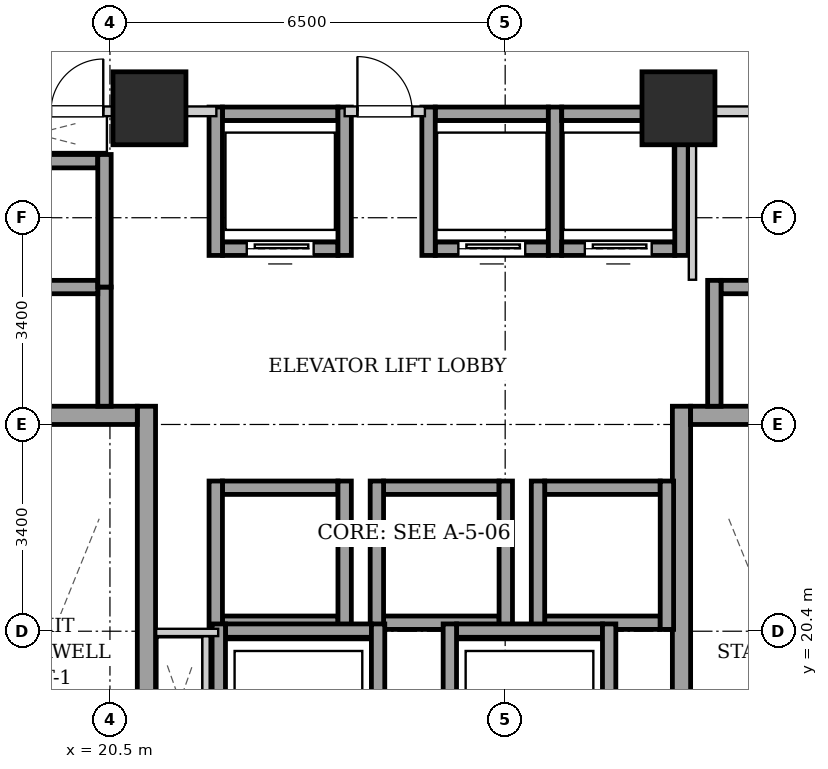
"""IFC4 building model, lengths in metres.
Left out: names, types, materials, properties, quantities, classifications, styles, units other than length and angle.
Written with IfcOpenShell. Run it as: python <this file> out.ifc"""

import sys

from ifc_helpers import new_model, si_unit, direction, frame, frame_2d, origin, origin_2d, place, context, subcontext, project, spatial, rectangle, extrude, element, fill, save


model = new_model("IFC4")
c1 = context("Model", 3, precision=1e-05, world=origin(), true_north=direction((0.0, 1.0)))
c2 = subcontext(c1, "Body", "Model", "MODEL_VIEW")
j1 = project(units=[si_unit("LENGTHUNIT", "METRE"), si_unit("PLANEANGLEUNIT", "RADIAN")], contexts=[c1])
p1 = place(None, origin())
s1 = spatial("IfcSite", under=j1, at=p1, CompositionType="ELEMENT")
p2 = place(p1, origin())
s2 = spatial("IfcBuilding", under=s1, at=p2, CompositionType="ELEMENT")
p3 = place(p2, frame((0.0, 0.0, 64.2)))
s3 = spatial("IfcBuildingStorey", under=s2, at=p3, CompositionType="ELEMENT", Elevation=64.2)
for number, where, z_axis, x_axis in (
    (1, (21.15, 29.0, 0.0), (0.0, 0.0, 1.0), (1.0, 0.0, 0.0)),
    (2, (29.85, 29.0, 0.0), (0.0, 0.0, 1.0), (1.0, 0.0, 0.0)),
):
    element("IfcColumn", number, at=place(p3, frame(where, z_axis=z_axis, x_axis=x_axis)), inside=s3, PredefinedType="COLUMN", context=c2, shape_type="SweptSolid", body=[
        extrude(rectangle(XDim=1.2, YDim=1.2, at=origin_2d()), origin(), (0.0, 0.0, 1.0), 3.2),
    ])
p4 = place(p3, frame((21.1, 15.1, 0.0), z_axis=(0.0, 0.0, 1.0), x_axis=(0.0, 1.0, 0.0)))
e3 = element("IfcWall", 3, at=p4, inside=s3, PredefinedType="SHEAR", context=c2, shape_type="SweptSolid", body=[
    extrude(rectangle(XDim=9.0, YDim=0.3, at=frame_2d((4.5, 0.0))), origin(), (0.0, 0.0, 1.0), 2.94),
])
p5 = place(p3, frame((18.1, 23.95, 0.0), z_axis=(0.0, 0.0, 1.0), x_axis=(1.0, 0.0, 0.0)))
e4 = element("IfcWall", 4, at=p5, inside=s3, PredefinedType="SHEAR", context=c2, shape_type="SweptSolid", body=[
    extrude(rectangle(XDim=2.85, YDim=0.3, at=frame_2d((1.425, 0.0))), origin(), (0.0, 0.0, 1.0), 2.94),
])
p6 = place(p3, frame((29.9, 15.1, 0.0), z_axis=(0.0, 0.0, 1.0), x_axis=(0.0, 1.0, 0.0)))
e5 = element("IfcWall", 5, at=p6, inside=s3, PredefinedType="SHEAR", context=c2, shape_type="SweptSolid", body=[
    extrude(rectangle(XDim=9.0, YDim=0.3, at=frame_2d((4.5, 0.0))), origin(), (0.0, 0.0, 1.0), 2.94),
])
p7 = place(p3, frame((30.05, 23.95, 0.0), z_axis=(0.0, 0.0, 1.0), x_axis=(1.0, 0.0, 0.0)))
e6 = element("IfcWall", 6, at=p7, inside=s3, PredefinedType="SHEAR", context=c2, shape_type="SweptSolid", body=[
    extrude(rectangle(XDim=2.85, YDim=0.3, at=frame_2d((1.425, 0.0))), origin(), (0.0, 0.0, 1.0), 2.94),
])
p8 = place(p3, frame((22.35, 26.69, 0.0), z_axis=(0.0, 0.0, 1.0), x_axis=(1.0, 0.0, 0.0)))
e7 = element("IfcWall", 7, at=p8, inside=s3, PredefinedType="SHEAR", context=c2, shape_type="SweptSolid", body=[
    extrude(rectangle(XDim=1.9, YDim=0.22, at=frame_2d((0.95, 0.0))), origin(), (0.0, 0.0, 1.0), 2.94),
])
p9 = place(p8, frame((0.4, 0.0, 0.0)))
e8 = element("IfcOpeningElement", 8, at=p9, cuts=e7, PredefinedType="OPENING", context=c2, shape_type="SweptSolid", body=[
    extrude(rectangle(XDim=1.1, YDim=2.15, at=frame_2d((0.55, 1.075))), frame((0.0, 0.12, 0.0), z_axis=(0.0, -1.0, 0.0), x_axis=(1.0, 0.0, 0.0)), (0.0, 0.0, 1.0), 0.24),
])
p10 = place(p3, frame((22.35, 28.91, 0.0), z_axis=(0.0, 0.0, 1.0), x_axis=(1.0, 0.0, 0.0)))
e9 = element("IfcWall", 9, at=p10, inside=s3, PredefinedType="SHEAR", context=c2, shape_type="SweptSolid", body=[
    extrude(rectangle(XDim=1.9, YDim=0.22, at=frame_2d((0.95, 0.0))), origin(), (0.0, 0.0, 1.0), 2.94),
])
for number, where, z_axis, x_axis in (
    (10, (22.24, 26.58, 0.0), (0.0, 0.0, 1.0), (0.0, 1.0, 0.0)),
    (11, (24.36, 26.58, 0.0), (0.0, 0.0, 1.0), (0.0, 1.0, 0.0)),
):
    element("IfcWall", number, at=place(p3, frame(where, z_axis=z_axis, x_axis=x_axis)), inside=s3, PredefinedType="SHEAR", context=c2, shape_type="SweptSolid", body=[
        extrude(rectangle(XDim=2.44, YDim=0.22, at=frame_2d((1.22, 0.0))), origin(), (0.0, 0.0, 1.0), 2.94),
    ])
p11 = place(p3, frame((25.85, 26.69, 0.0), z_axis=(0.0, 0.0, 1.0), x_axis=(1.0, 0.0, 0.0)))
e12 = element("IfcWall", 12, at=p11, inside=s3, PredefinedType="SHEAR", context=c2, shape_type="SweptSolid", body=[
    extrude(rectangle(XDim=1.86, YDim=0.22, at=frame_2d((0.93, 0.0))), origin(), (0.0, 0.0, 1.0), 2.94),
])
p12 = place(p11, frame((0.38, 0.0, 0.0)))
e13 = element("IfcOpeningElement", 13, at=p12, cuts=e12, PredefinedType="OPENING", context=c2, shape_type="SweptSolid", body=[
    extrude(rectangle(XDim=1.1, YDim=2.15, at=frame_2d((0.55, 1.075))), frame((0.0, 0.12, 0.0), z_axis=(0.0, -1.0, 0.0), x_axis=(1.0, 0.0, 0.0)), (0.0, 0.0, 1.0), 0.24),
])
p13 = place(p3, frame((25.85, 28.91, 0.0), z_axis=(0.0, 0.0, 1.0), x_axis=(1.0, 0.0, 0.0)))
e14 = element("IfcWall", 14, at=p13, inside=s3, PredefinedType="SHEAR", context=c2, shape_type="SweptSolid", body=[
    extrude(rectangle(XDim=1.86, YDim=0.22, at=frame_2d((0.93, 0.0))), origin(), (0.0, 0.0, 1.0), 2.94),
])
for number, where, z_axis, x_axis in (
    (15, (25.74, 26.58, 0.0), (0.0, 0.0, 1.0), (0.0, 1.0, 0.0)),
    (16, (27.82, 26.58, 0.0), (0.0, 0.0, 1.0), (0.0, 1.0, 0.0)),
):
    element("IfcWall", number, at=place(p3, frame(where, z_axis=z_axis, x_axis=x_axis)), inside=s3, PredefinedType="SHEAR", context=c2, shape_type="SweptSolid", body=[
        extrude(rectangle(XDim=2.44, YDim=0.22, at=frame_2d((1.22, 0.0))), origin(), (0.0, 0.0, 1.0), 2.94),
    ])
p14 = place(p3, frame((27.93, 26.69, 0.0), z_axis=(0.0, 0.0, 1.0), x_axis=(1.0, 0.0, 0.0)))
e17 = element("IfcWall", 17, at=p14, inside=s3, PredefinedType="SHEAR", context=c2, shape_type="SweptSolid", body=[
    extrude(rectangle(XDim=1.86, YDim=0.22, at=frame_2d((0.93, 0.0))), origin(), (0.0, 0.0, 1.0), 2.94),
])
p15 = place(p14, frame((0.38, 0.0, 0.0)))
e18 = element("IfcOpeningElement", 18, at=p15, cuts=e17, PredefinedType="OPENING", context=c2, shape_type="SweptSolid", body=[
    extrude(rectangle(XDim=1.1, YDim=2.15, at=frame_2d((0.55, 1.075))), frame((0.0, 0.12, 0.0), z_axis=(0.0, -1.0, 0.0), x_axis=(1.0, 0.0, 0.0)), (0.0, 0.0, 1.0), 0.24),
])
p16 = place(p3, frame((27.93, 28.91, 0.0), z_axis=(0.0, 0.0, 1.0), x_axis=(1.0, 0.0, 0.0)))
e19 = element("IfcWall", 19, at=p16, inside=s3, PredefinedType="SHEAR", context=c2, shape_type="SweptSolid", body=[
    extrude(rectangle(XDim=1.86, YDim=0.22, at=frame_2d((0.93, 0.0))), origin(), (0.0, 0.0, 1.0), 2.94),
])
p17 = place(p3, frame((29.9, 26.58, 0.0), z_axis=(0.0, 0.0, 1.0), x_axis=(0.0, 1.0, 0.0)))
e20 = element("IfcWall", 20, at=p17, inside=s3, PredefinedType="SHEAR", context=c2, shape_type="SweptSolid", body=[
    extrude(rectangle(XDim=2.44, YDim=0.22, at=frame_2d((1.22, 0.0))), origin(), (0.0, 0.0, 1.0), 2.94),
])
for number, where, z_axis, x_axis in (
    (21, (22.35, 20.54, 0.0), (0.0, 0.0, 1.0), (1.0, 0.0, 0.0)),
    (22, (22.35, 22.76, 0.0), (0.0, 0.0, 1.0), (1.0, 0.0, 0.0)),
):
    element("IfcWall", number, at=place(p3, frame(where, z_axis=z_axis, x_axis=x_axis)), inside=s3, PredefinedType="SHEAR", context=c2, shape_type="SweptSolid", body=[
        extrude(rectangle(XDim=1.9, YDim=0.22, at=frame_2d((0.95, 0.0))), origin(), (0.0, 0.0, 1.0), 2.94),
    ])
for number, where, z_axis, x_axis in (
    (23, (22.24, 20.43, 0.0), (0.0, 0.0, 1.0), (0.0, 1.0, 0.0)),
    (24, (24.36, 20.43, 0.0), (0.0, 0.0, 1.0), (0.0, 1.0, 0.0)),
):
    element("IfcWall", number, at=place(p3, frame(where, z_axis=z_axis, x_axis=x_axis)), inside=s3, PredefinedType="SHEAR", context=c2, shape_type="SweptSolid", body=[
        extrude(rectangle(XDim=2.44, YDim=0.22, at=frame_2d((1.22, 0.0))), origin(), (0.0, 0.0, 1.0), 2.94),
    ])
for number, where, z_axis, x_axis in (
    (25, (25.0, 20.54, 0.0), (0.0, 0.0, 1.0), (1.0, 0.0, 0.0)),
    (26, (25.0, 22.76, 0.0), (0.0, 0.0, 1.0), (1.0, 0.0, 0.0)),
):
    element("IfcWall", number, at=place(p3, frame(where, z_axis=z_axis, x_axis=x_axis)), inside=s3, PredefinedType="SHEAR", context=c2, shape_type="SweptSolid", body=[
        extrude(rectangle(XDim=1.9, YDim=0.22, at=frame_2d((0.95, 0.0))), origin(), (0.0, 0.0, 1.0), 2.94),
    ])
for number, where, z_axis, x_axis in (
    (27, (24.89, 20.43, 0.0), (0.0, 0.0, 1.0), (0.0, 1.0, 0.0)),
    (28, (27.01, 20.43, 0.0), (0.0, 0.0, 1.0), (0.0, 1.0, 0.0)),
):
    element("IfcWall", number, at=place(p3, frame(where, z_axis=z_axis, x_axis=x_axis)), inside=s3, PredefinedType="SHEAR", context=c2, shape_type="SweptSolid", body=[
        extrude(rectangle(XDim=2.44, YDim=0.22, at=frame_2d((1.22, 0.0))), origin(), (0.0, 0.0, 1.0), 2.94),
    ])
for number, where, z_axis, x_axis in (
    (29, (27.65, 20.54, 0.0), (0.0, 0.0, 1.0), (1.0, 0.0, 0.0)),
    (30, (27.65, 22.76, 0.0), (0.0, 0.0, 1.0), (1.0, 0.0, 0.0)),
):
    element("IfcWall", number, at=place(p3, frame(where, z_axis=z_axis, x_axis=x_axis)), inside=s3, PredefinedType="SHEAR", context=c2, shape_type="SweptSolid", body=[
        extrude(rectangle(XDim=1.9, YDim=0.22, at=frame_2d((0.95, 0.0))), origin(), (0.0, 0.0, 1.0), 2.94),
    ])
for number, where, z_axis, x_axis in (
    (31, (27.54, 20.43, 0.0), (0.0, 0.0, 1.0), (0.0, 1.0, 0.0)),
    (32, (29.66, 20.43, 0.0), (0.0, 0.0, 1.0), (0.0, 1.0, 0.0)),
):
    element("IfcWall", number, at=place(p3, frame(where, z_axis=z_axis, x_axis=x_axis)), inside=s3, PredefinedType="SHEAR", context=c2, shape_type="SweptSolid", body=[
        extrude(rectangle(XDim=2.44, YDim=0.22, at=frame_2d((1.22, 0.0))), origin(), (0.0, 0.0, 1.0), 2.94),
    ])
p18 = place(p3, frame((20.41, 24.1, 0.0), z_axis=(0.0, 0.0, 1.0), x_axis=(0.0, 1.0, 0.0)))
e33 = element("IfcWall", 33, at=p18, inside=s3, PredefinedType="SHEAR", context=c2, shape_type="SweptSolid", body=[
    extrude(rectangle(XDim=1.96, YDim=0.22, at=frame_2d((0.98, 0.0))), origin(), (0.0, 0.0, 1.0), 2.94),
])
for number, where, z_axis, x_axis in (
    (34, (18.4, 26.06, 0.0), (0.0, 0.0, 1.0), (1.0, 0.0, 0.0)),
    (35, (18.4, 28.13, 0.0), (0.0, 0.0, 1.0), (1.0, 0.0, 0.0)),
):
    element("IfcWall", number, at=place(p3, frame(where, z_axis=z_axis, x_axis=x_axis)), inside=s3, PredefinedType="SHEAR", context=c2, shape_type="SweptSolid", body=[
        extrude(rectangle(XDim=1.9, YDim=0.22, at=frame_2d((0.95, 0.0))), origin(), (0.0, 0.0, 1.0), 2.94),
    ])
p19 = place(p3, frame((20.41, 26.06, 0.0), z_axis=(0.0, 0.0, 1.0), x_axis=(0.0, 1.0, 0.0)))
e36 = element("IfcWall", 36, at=p19, inside=s3, PredefinedType="SHEAR", context=c2, shape_type="SweptSolid", body=[
    extrude(rectangle(XDim=2.18, YDim=0.22, at=frame_2d((1.09, 0.0))), origin(), (0.0, 0.0, 1.0), 2.94),
])
p20 = place(p3, frame((30.55, 26.06, 0.0), z_axis=(0.0, 0.0, 1.0), x_axis=(1.0, 0.0, 0.0)))
e37 = element("IfcWall", 37, at=p20, inside=s3, PredefinedType="SHEAR", context=c2, shape_type="SweptSolid", body=[
    extrude(rectangle(XDim=1.9, YDim=0.22, at=frame_2d((0.95, 0.0))), origin(), (0.0, 0.0, 1.0), 2.94),
])
p21 = place(p3, frame((30.44, 24.1, 0.0), z_axis=(0.0, 0.0, 1.0), x_axis=(0.0, 1.0, 0.0)))
e38 = element("IfcWall", 38, at=p21, inside=s3, PredefinedType="SHEAR", context=c2, shape_type="SweptSolid", body=[
    extrude(rectangle(XDim=2.07, YDim=0.22, at=frame_2d((1.035, 0.0))), origin(), (0.0, 0.0, 1.0), 2.94),
])
p22 = place(p3, frame((22.4, 20.41, 0.0), z_axis=(0.0, 0.0, 1.0), x_axis=(1.0, 0.0, 0.0)))
e39 = element("IfcWall", 39, at=p22, inside=s3, PredefinedType="SHEAR", context=c2, shape_type="SweptSolid", body=[
    extrude(rectangle(XDim=2.4, YDim=0.22, at=frame_2d((1.2, 0.0))), origin(), (0.0, 0.0, 1.0), 2.94),
])
for number, where, z_axis, x_axis in (
    (40, (22.29, 17.98, 0.0), (0.0, 0.0, 1.0), (0.0, 1.0, 0.0)),
    (41, (24.91, 17.98, 0.0), (0.0, 0.0, 1.0), (0.0, 1.0, 0.0)),
):
    element("IfcWall", number, at=place(p3, frame(where, z_axis=z_axis, x_axis=x_axis)), inside=s3, PredefinedType="SHEAR", context=c2, shape_type="SweptSolid", body=[
        extrude(rectangle(XDim=2.54, YDim=0.22, at=frame_2d((1.27, 0.0))), origin(), (0.0, 0.0, 1.0), 2.94),
    ])
p23 = place(p3, frame((26.2, 20.41, 0.0), z_axis=(0.0, 0.0, 1.0), x_axis=(1.0, 0.0, 0.0)))
e42 = element("IfcWall", 42, at=p23, inside=s3, PredefinedType="SHEAR", context=c2, shape_type="SweptSolid", body=[
    extrude(rectangle(XDim=2.4, YDim=0.22, at=frame_2d((1.2, 0.0))), origin(), (0.0, 0.0, 1.0), 2.94),
])
for number, where, z_axis, x_axis in (
    (43, (26.09, 17.98, 0.0), (0.0, 0.0, 1.0), (0.0, 1.0, 0.0)),
    (44, (28.71, 17.98, 0.0), (0.0, 0.0, 1.0), (0.0, 1.0, 0.0)),
):
    element("IfcWall", number, at=place(p3, frame(where, z_axis=z_axis, x_axis=x_axis)), inside=s3, PredefinedType="SHEAR", context=c2, shape_type="SweptSolid", body=[
        extrude(rectangle(XDim=2.54, YDim=0.22, at=frame_2d((1.27, 0.0))), origin(), (0.0, 0.0, 1.0), 2.94),
    ])
p24 = place(p3, frame((24.36, 28.95, 0.0), z_axis=(0.0, 0.0, 1.0), x_axis=(1.0, 0.0, 0.0)))
e45 = element("IfcWall", 45, at=p24, inside=s3, PredefinedType="PARTITIONING", context=c2, shape_type="SweptSolid", body=[
    extrude(rectangle(XDim=1.32, YDim=0.16, at=frame_2d((0.66, 0.0))), origin(), (0.0, 0.0, 1.0), 2.232),
])
p25 = place(p24, frame((0.21, 0.0, 0.0)))
e46 = element("IfcOpeningElement", 46, at=p25, cuts=e45, PredefinedType="OPENING", context=c2, shape_type="SweptSolid", body=[
    extrude(rectangle(XDim=0.9, YDim=2.05, at=frame_2d((0.45, 1.025))), frame((0.0, 0.09, 0.0), z_axis=(0.0, -1.0, 0.0), x_axis=(1.0, 0.0, 0.0)), (0.0, 0.0, 1.0), 0.18),
])
p26 = place(p3, frame((17.96, 28.95, 0.0), z_axis=(0.0, 0.0, 1.0), x_axis=(1.0, 0.0, 0.0)))
e47 = element("IfcWall", 47, at=p26, inside=s3, PredefinedType="PARTITIONING", context=c2, shape_type="SweptSolid", body=[
    extrude(rectangle(XDim=4.29, YDim=0.16, at=frame_2d((2.145, 0.0))), origin(), (0.0, 0.0, 1.0), 2.232),
])
p27 = place(p26, frame((1.57, 0.0, 0.0)))
e48 = element("IfcOpeningElement", 48, at=p27, cuts=e47, PredefinedType="OPENING", context=c2, shape_type="SweptSolid", body=[
    extrude(rectangle(XDim=0.86, YDim=2.05, at=frame_2d((0.43, 1.025))), frame((0.0, 0.09, 0.0), z_axis=(0.0, -1.0, 0.0), x_axis=(1.0, 0.0, 0.0)), (0.0, 0.0, 1.0), 0.18),
])
p28 = place(p3, frame((22.08, 18.2, 0.0), z_axis=(0.0, 0.0, 1.0), x_axis=(0.0, 1.0, 0.0)))
e49 = element("IfcWall", 49, at=p28, inside=s3, PredefinedType="PARTITIONING", context=c2, shape_type="SweptSolid", body=[
    extrude(rectangle(XDim=2.12, YDim=0.12, at=frame_2d((1.06, 0.0))), origin(), (0.0, 0.0, 1.0), 2.94),
])
p29 = place(p3, frame((22.28, 20.38, 0.0), z_axis=(0.0, 0.0, 1.0), x_axis=(-1.0, 0.0, 0.0)))
e50 = element("IfcWall", 50, at=p29, inside=s3, PredefinedType="PARTITIONING", context=c2, shape_type="SweptSolid", body=[
    extrude(rectangle(XDim=1.02, YDim=0.12, at=frame_2d((0.51, 0.0))), origin(), (0.0, 0.0, 1.0), 2.94),
])
p30 = place(p3, frame((30.08, 26.18, 0.0), z_axis=(0.0, 0.0, 1.0), x_axis=(0.0, 1.0, 0.0)))
e51 = element("IfcWall", 51, at=p30, inside=s3, PredefinedType="PARTITIONING", context=c2, shape_type="SweptSolid", body=[
    extrude(rectangle(XDim=2.68, YDim=0.12, at=frame_2d((1.34, 0.0))), origin(), (0.0, 0.0, 1.0), 2.94),
])
p31 = place(p3, frame((30.08, 28.95, 0.0), z_axis=(0.0, 0.0, 1.0), x_axis=(1.0, 0.0, 0.0)))
e52 = element("IfcWall", 52, at=p31, inside=s3, PredefinedType="PARTITIONING", context=c2, shape_type="SweptSolid", body=[
    extrude(rectangle(XDim=2.96, YDim=0.16, at=frame_2d((1.48, 0.0))), origin(), (0.0, 0.0, 1.0), 2.94),
])
p32 = place(p31, frame((1.045, 0.0, 0.0)))
e53 = element("IfcOpeningElement", 53, at=p32, cuts=e52, PredefinedType="OPENING", context=c2, shape_type="SweptSolid", body=[
    extrude(rectangle(XDim=0.86, YDim=2.05, at=frame_2d((0.43, 1.025))), frame((0.0, 0.09, 0.0), z_axis=(0.0, -1.0, 0.0), x_axis=(1.0, 0.0, 0.0)), (0.0, 0.0, 1.0), 0.18),
])
p33 = place(p9, origin())
e54 = element("IfcDoor", 54, at=p33, inside=s3, OperationType="SLIDING_TO_LEFT", PredefinedType="DOOR", context=c2, shape_type="SweptSolid", body=[
    extrude(rectangle(XDim=1.1, YDim=2.15, at=frame_2d((0.55, 1.075))), frame((0.0, 0.025, 0.0), z_axis=(0.0, -1.0, 0.0), x_axis=(1.0, 0.0, 0.0)), (0.0, 0.0, 1.0), 0.05),
])
fill(e8, e54)
p34 = place(p12, origin())
e55 = element("IfcDoor", 55, at=p34, inside=s3, OperationType="SLIDING_TO_LEFT", PredefinedType="DOOR", context=c2, shape_type="SweptSolid", body=[
    extrude(rectangle(XDim=1.1, YDim=2.15, at=frame_2d((0.55, 1.075))), frame((0.0, 0.025, 0.0), z_axis=(0.0, -1.0, 0.0), x_axis=(1.0, 0.0, 0.0)), (0.0, 0.0, 1.0), 0.05),
])
fill(e13, e55)
p35 = place(p15, origin())
e56 = element("IfcDoor", 56, at=p35, inside=s3, OperationType="SLIDING_TO_LEFT", PredefinedType="DOOR", context=c2, shape_type="SweptSolid", body=[
    extrude(rectangle(XDim=1.1, YDim=2.15, at=frame_2d((0.55, 1.075))), frame((0.0, 0.025, 0.0), z_axis=(0.0, -1.0, 0.0), x_axis=(1.0, 0.0, 0.0)), (0.0, 0.0, 1.0), 0.05),
])
fill(e18, e56)
p36 = place(p25, origin())
e57 = element("IfcDoor", 57, at=p36, inside=s3, OperationType="SINGLE_SWING_LEFT", PredefinedType="DOOR", context=c2, shape_type="SweptSolid", body=[
    extrude(rectangle(XDim=0.9, YDim=2.05, at=frame_2d((0.45, 1.025))), frame((0.0, 0.025, 0.0), z_axis=(0.0, -1.0, 0.0), x_axis=(1.0, 0.0, 0.0)), (0.0, 0.0, 1.0), 0.05),
])
fill(e46, e57)
p37 = place(p27, origin())
e58 = element("IfcDoor", 58, at=p37, inside=s3, OperationType="SINGLE_SWING_RIGHT", PredefinedType="DOOR", context=c2, shape_type="SweptSolid", body=[
    extrude(rectangle(XDim=0.86, YDim=2.05, at=frame_2d((0.43, 1.025))), frame((0.0, 0.025, 0.0), z_axis=(0.0, -1.0, 0.0), x_axis=(1.0, 0.0, 0.0)), (0.0, 0.0, 1.0), 0.05),
])
fill(e48, e58)
save(model, sys.argv[1])
